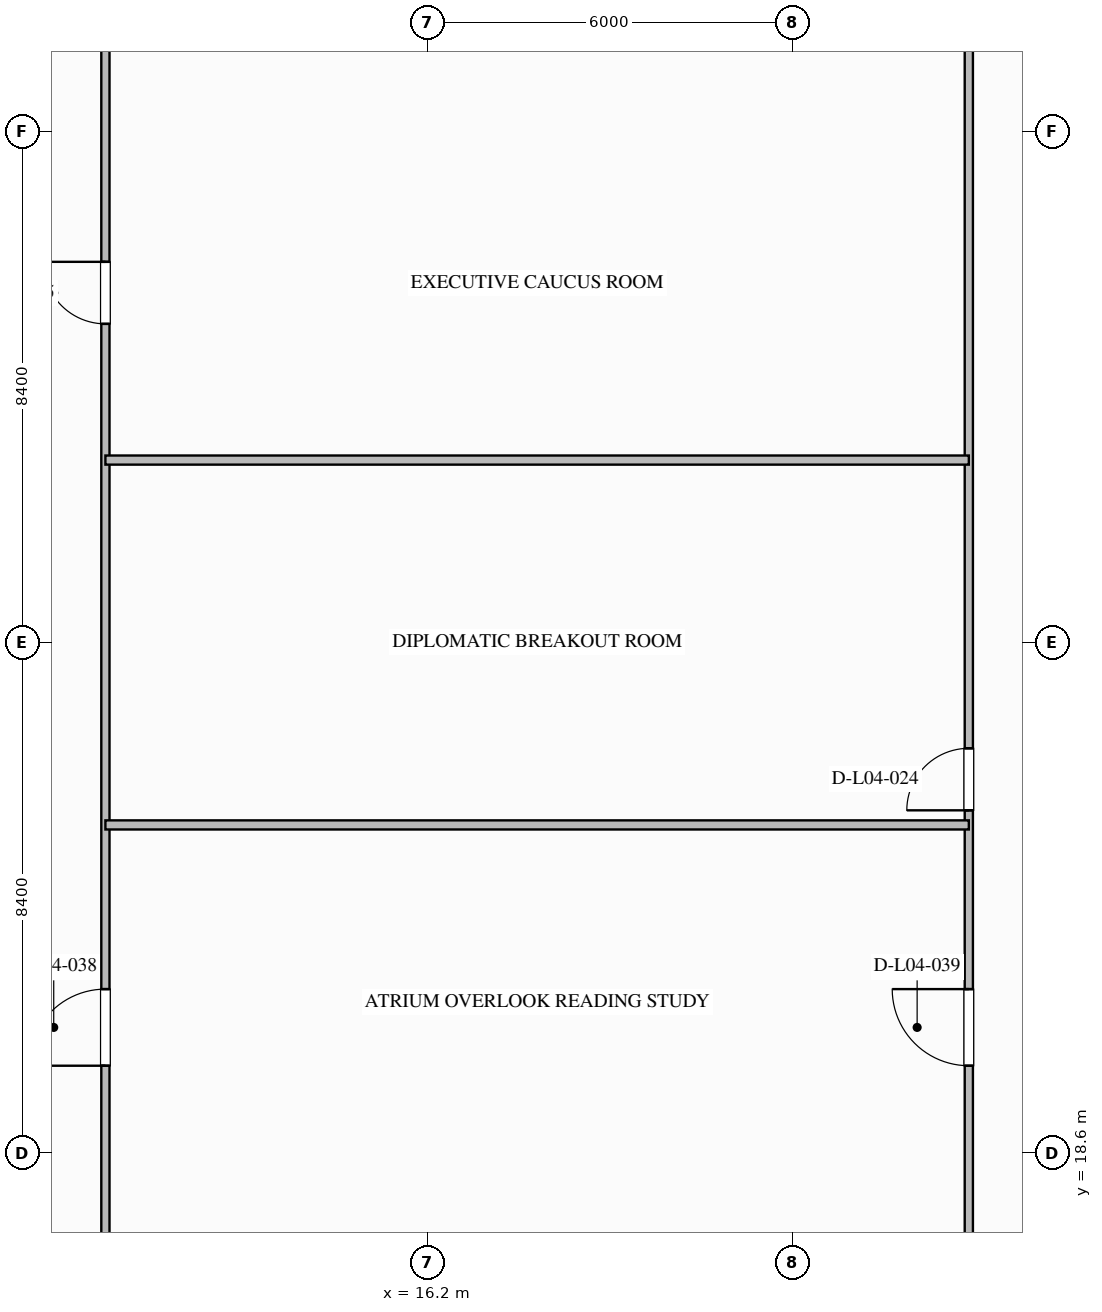
"""IFC4 building model, lengths in metres.
Left out: names, types, materials, properties, quantities, classifications, styles, units other than length and angle.
Written with IfcOpenShell. Run it as: python <this file> out.ifc"""

import sys

from ifc_helpers import new_model, si_unit, direction, frame, frame_2d, origin, place, context, subcontext, project, spatial, rectangle, extrude, element, fill, save


model = new_model("IFC4")
c1 = context("Model", 3, precision=1e-05, world=origin(), true_north=direction((0.0, 1.0)))
c2 = subcontext(c1, "Body", "Model", "MODEL_VIEW")
j1 = project(units=[si_unit("LENGTHUNIT", "METRE"), si_unit("PLANEANGLEUNIT", "RADIAN")], contexts=[c1])
p1 = place(None, origin())
s1 = spatial("IfcSite", under=j1, at=p1, CompositionType="ELEMENT")
p2 = place(p1, origin())
s2 = spatial("IfcBuilding", under=s1, at=p2, CompositionType="ELEMENT")
p3 = place(p2, frame((0.0, 0.0, 22.4)))
s3 = spatial("IfcBuildingStorey", under=s2, at=p3, CompositionType="ELEMENT", Elevation=22.4)
p4 = place(p3, frame((10.9, 16.04, 0.0), z_axis=(0.0, 0.0, 1.0), x_axis=(0.0, 1.0, 0.0)))
e1 = element("IfcWall", 1, at=p4, inside=s3, PredefinedType="PARTITIONING", context=c2, shape_type="SweptSolid", body=[
    extrude(rectangle(XDim=21.92, YDim=0.135, at=frame_2d((10.96, 0.0))), origin(), (0.0, 0.0, 1.0), 4.85),
])
p5 = place(p4, frame((16.2, 0.0, 0.0)))
e2 = element("IfcOpeningElement", 2, at=p5, cuts=e1, PredefinedType="OPENING", context=c2, shape_type="SweptSolid", body=[
    extrude(rectangle(XDim=1.02, YDim=2.15, at=frame_2d((0.51, 1.075))), frame((0.0, 0.077, 0.0), z_axis=(0.0, -1.0, 0.0), x_axis=(1.0, 0.0, 0.0)), (0.0, 0.0, 1.0), 0.155),
])
p6 = place(p4, frame((4.0, 0.0, 0.0)))
e3 = element("IfcOpeningElement", 3, at=p6, cuts=e1, PredefinedType="OPENING", context=c2, shape_type="SweptSolid", body=[
    extrude(rectangle(XDim=1.26, YDim=2.2, at=frame_2d((0.63, 1.1))), frame((0.0, 0.077, 0.0), z_axis=(0.0, -1.0, 0.0), x_axis=(1.0, 0.0, 0.0)), (0.0, 0.0, 1.0), 0.155),
])
p7 = place(p3, frame((25.1, 16.04, 0.0), z_axis=(0.0, 0.0, 1.0), x_axis=(0.0, 1.0, 0.0)))
e4 = element("IfcWall", 4, at=p7, inside=s3, PredefinedType="PARTITIONING", context=c2, shape_type="SweptSolid", body=[
    extrude(rectangle(XDim=21.92, YDim=0.135, at=frame_2d((10.96, 0.0))), origin(), (0.0, 0.0, 1.0), 4.85),
])
p8 = place(p7, frame((8.2, 0.0, 0.0)))
e5 = element("IfcOpeningElement", 5, at=p8, cuts=e4, PredefinedType="OPENING", context=c2, shape_type="SweptSolid", body=[
    extrude(rectangle(XDim=1.02, YDim=2.15, at=frame_2d((0.51, 1.075))), frame((0.0, 0.077, 0.0), z_axis=(0.0, -1.0, 0.0), x_axis=(1.0, 0.0, 0.0)), (0.0, 0.0, 1.0), 0.155),
])
p9 = place(p7, frame((4.0, 0.0, 0.0)))
e6 = element("IfcOpeningElement", 6, at=p9, cuts=e4, PredefinedType="OPENING", context=c2, shape_type="SweptSolid", body=[
    extrude(rectangle(XDim=1.26, YDim=2.2, at=frame_2d((0.63, 1.1))), frame((0.0, 0.077, 0.0), z_axis=(0.0, -1.0, 0.0), x_axis=(1.0, 0.0, 0.0)), (0.0, 0.0, 1.0), 0.155),
])
for number, where, z_axis, x_axis in (
    (7, (10.9, 24.0, 0.0), (0.0, 0.0, 1.0), (1.0, 0.0, 0.0)),
    (8, (10.9, 30.0, 0.0), (0.0, 0.0, 1.0), (1.0, 0.0, 0.0)),
):
    element("IfcWall", number, at=place(p3, frame(where, z_axis=z_axis, x_axis=x_axis)), inside=s3, PredefinedType="PARTITIONING", context=c2, shape_type="SweptSolid", body=[
        extrude(rectangle(XDim=14.2, YDim=0.15, at=frame_2d((7.1, 0.0))), origin(), (0.0, 0.0, 1.0), 4.85),
    ])
p10 = place(p8, origin())
e9 = element("IfcDoor", 9, at=p10, inside=s3, OperationType="SINGLE_SWING_LEFT", PredefinedType="DOOR", context=c2, shape_type="SweptSolid", body=[
    extrude(rectangle(XDim=1.02, YDim=2.15, at=frame_2d((0.51, 1.075))), frame((0.0, 0.025, 0.0), z_axis=(0.0, -1.0, 0.0), x_axis=(1.0, 0.0, 0.0)), (0.0, 0.0, 1.0), 0.05),
])
fill(e5, e9)
p11 = place(p5, origin())
e10 = element("IfcDoor", 10, at=p11, inside=s3, OperationType="SINGLE_SWING_RIGHT", PredefinedType="DOOR", context=c2, shape_type="SweptSolid", body=[
    extrude(rectangle(XDim=1.02, YDim=2.15, at=frame_2d((0.51, 1.075))), frame((0.0, 0.025, 0.0), z_axis=(0.0, -1.0, 0.0), x_axis=(1.0, 0.0, 0.0)), (0.0, 0.0, 1.0), 0.05),
])
fill(e2, e10)
p12 = place(p6, origin())
e11 = element("IfcDoor", 11, at=p12, inside=s3, OperationType="SINGLE_SWING_LEFT", PredefinedType="DOOR", context=c2, shape_type="SweptSolid", body=[
    extrude(rectangle(XDim=1.26, YDim=2.2, at=frame_2d((0.63, 1.1))), frame((0.0, 0.025, 0.0), z_axis=(0.0, -1.0, 0.0), x_axis=(1.0, 0.0, 0.0)), (0.0, 0.0, 1.0), 0.05),
])
fill(e3, e11)
p13 = place(p9, origin())
e12 = element("IfcDoor", 12, at=p13, inside=s3, OperationType="SINGLE_SWING_RIGHT", PredefinedType="DOOR", context=c2, shape_type="SweptSolid", body=[
    extrude(rectangle(XDim=1.26, YDim=2.2, at=frame_2d((0.63, 1.1))), frame((0.0, 0.025, 0.0), z_axis=(0.0, -1.0, 0.0), x_axis=(1.0, 0.0, 0.0)), (0.0, 0.0, 1.0), 0.05),
])
fill(e6, e12)
save(model, sys.argv[1])
